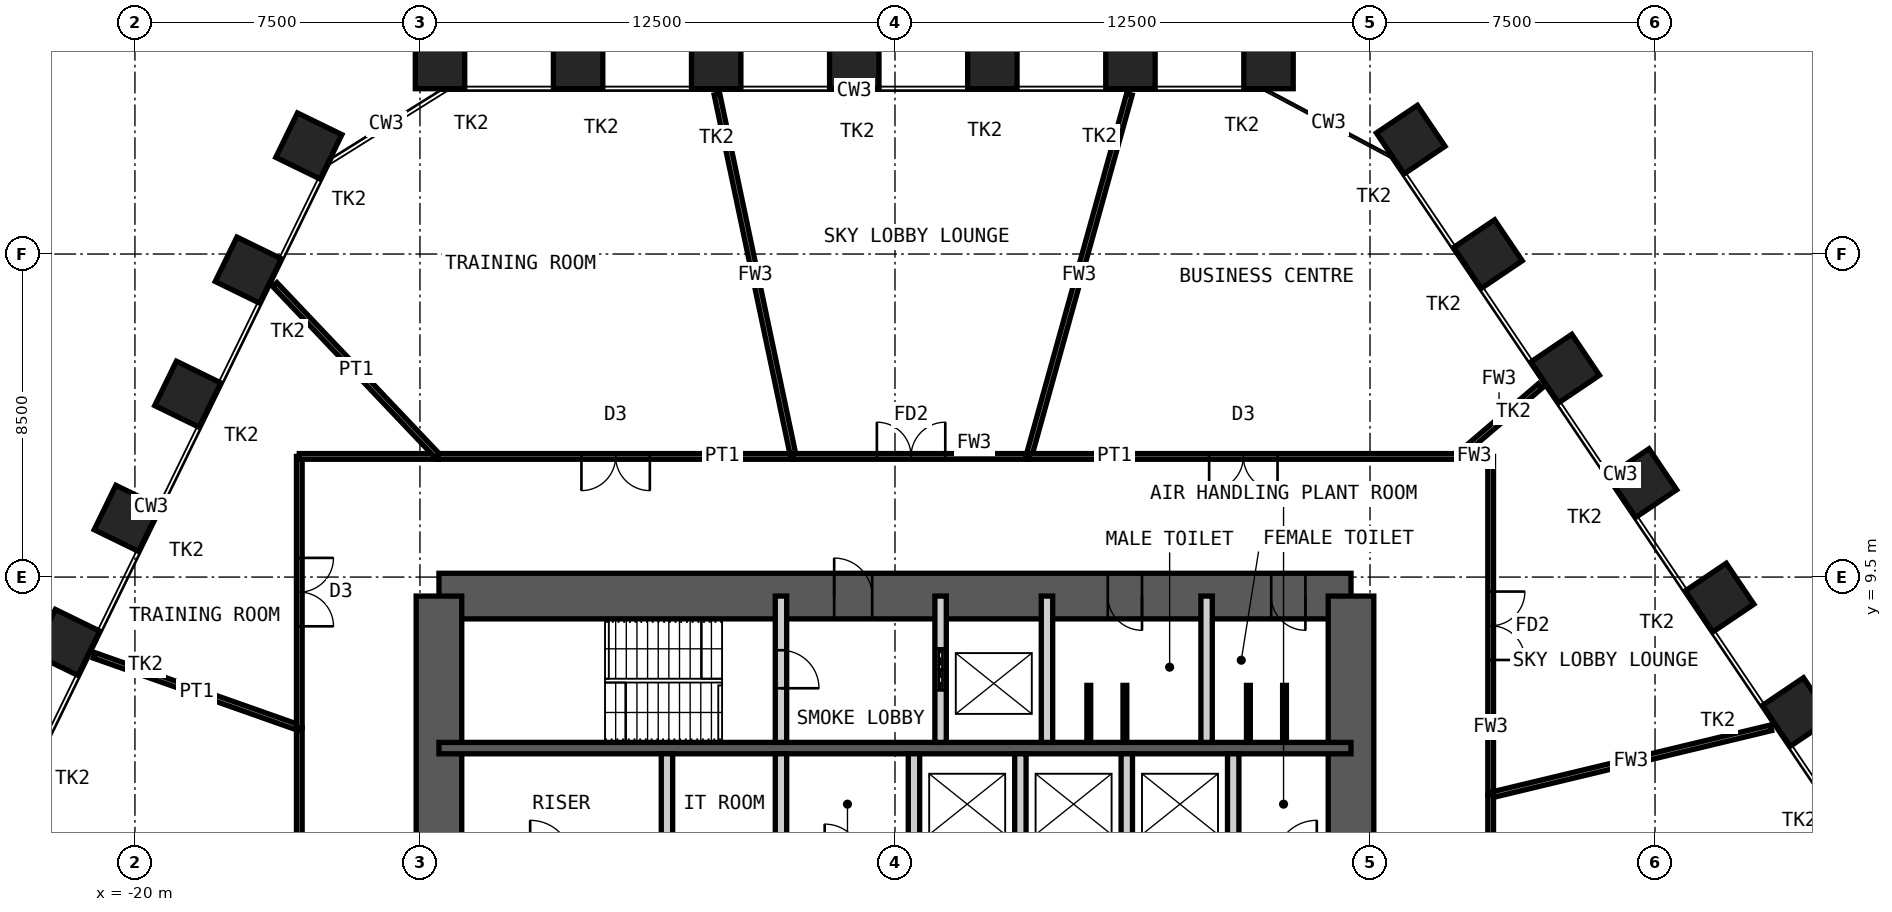
"""IFC4 building model, lengths in metres.
Left out: names, types, materials, properties, quantities, classifications, styles, units other than length and angle.
Written with IfcOpenShell. Run it as: python <this file> out.ifc"""

import sys

from ifc_helpers import new_model, si_unit, direction, frame, frame_2d, origin, origin_2d, place, context, subcontext, project, spatial, rectangle, hollow_rectangle, extrude, element, fill, save


model = new_model("IFC4")
c1 = context("Model", 3, precision=1e-05, world=origin(), true_north=direction((0.0, 1.0)))
c2 = subcontext(c1, "Body", "Model", "MODEL_VIEW")
j1 = project(units=[si_unit("LENGTHUNIT", "METRE"), si_unit("PLANEANGLEUNIT", "RADIAN")], contexts=[c1])
p1 = place(None, origin())
s1 = spatial("IfcSite", under=j1, at=p1, CompositionType="ELEMENT")
p2 = place(p1, origin())
s2 = spatial("IfcBuilding", under=s1, at=p2, CompositionType="ELEMENT")
p3 = place(p2, frame((0.0, 0.0, 180.4)))
s3 = spatial("IfcBuildingStorey", under=s2, at=p3, CompositionType="ELEMENT", Elevation=180.4)
for number, where, z_axis, x_axis in (
    (1, (-11.972, 23.0, 0.0), (0.0, 0.0, 1.0), (-1.0, 0.0, 0.0)),
    (2, (-8.338, 23.0, 0.0), (0.0, 0.0, 1.0), (-1.0, 0.0, 0.0)),
    (3, (-4.705, 23.0, 0.0), (0.0, 0.0, 1.0), (-1.0, 0.0, 0.0)),
    (4, (-1.071, 23.0, 0.0), (0.0, 0.0, 1.0), (-1.0, 0.0, 0.0)),
    (5, (2.562, 23.0, 0.0), (0.0, 0.0, 1.0), (-1.0, 0.0, 0.0)),
    (6, (6.196, 23.0, 0.0), (0.0, 0.0, 1.0), (-1.0, 0.0, 0.0)),
    (7, (9.829, 23.0, 0.0), (0.0, 0.0, 1.0), (-1.0, 0.0, 0.0)),
    (8, (13.571, 21.01, 0.0), (0.0, 0.0, 1.0), (-0.559, 0.829, 0.0)),
    (9, (15.603, 17.998, 0.0), (0.0, 0.0, 1.0), (-0.559, 0.829, 0.0)),
    (10, (17.635, 14.986, 0.0), (0.0, 0.0, 1.0), (-0.559, 0.829, 0.0)),
    (11, (19.667, 11.973, 0.0), (0.0, 0.0, 1.0), (-0.559, 0.829, 0.0)),
    (12, (21.699, 8.961, 0.0), (0.0, 0.0, 1.0), (-0.559, 0.829, 0.0)),
    (13, (23.731, 5.948, 0.0), (0.0, 0.0, 1.0), (-0.559, 0.829, 0.0)),
    (14, (-21.795, 7.78, 0.0), (0.0, 0.0, 1.0), (-0.438, -0.899, 0.0)),
    (15, (-20.203, 11.045, 0.0), (0.0, 0.0, 1.0), (-0.438, -0.899, 0.0)),
    (16, (-18.61, 14.311, 0.0), (0.0, 0.0, 1.0), (-0.438, -0.899, 0.0)),
    (17, (-17.017, 17.577, 0.0), (0.0, 0.0, 1.0), (-0.438, -0.899, 0.0)),
    (18, (-15.424, 20.843, 0.0), (0.0, 0.0, 1.0), (-0.438, -0.899, 0.0)),
):
    element("IfcColumn", number, at=place(p3, frame(where, z_axis=z_axis, x_axis=x_axis)), inside=s3, PredefinedType="COLUMN", context=c2, shape_type="SweptSolid", body=[
        extrude(hollow_rectangle(XDim=1.3, YDim=1.3, WallThickness=0.1, at=origin_2d()), origin(), (0.0, 0.0, 1.0), 4.2),
    ])
p4 = place(p3, frame((-12.0, 9.0, 0.0), z_axis=(0.0, 0.0, 1.0), x_axis=(1.0, 0.0, 0.0)))
e19 = element("IfcWall", 19, at=p4, inside=s3, PredefinedType="SHEAR", context=c2, shape_type="SweptSolid", body=[
    extrude(rectangle(XDim=24.0, YDim=1.2, at=frame_2d((12.0, 0.0))), origin(), (0.0, 0.0, 1.0), 4.2),
])
p5 = place(p4, frame((10.4, 0.0, 0.0)))
e20 = element("IfcOpeningElement", 20, at=p5, cuts=e19, PredefinedType="OPENING", context=c2, shape_type="SweptSolid", body=[
    extrude(rectangle(XDim=1.0, YDim=2.1, at=frame_2d((0.5, 1.05))), frame((0.0, 0.61, 0.0), z_axis=(0.0, -1.0, 0.0), x_axis=(1.0, 0.0, 0.0)), (0.0, 0.0, 1.0), 1.22),
])
p6 = place(p4, frame((17.6, 0.0, 0.0)))
e21 = element("IfcOpeningElement", 21, at=p6, cuts=e19, PredefinedType="OPENING", context=c2, shape_type="SweptSolid", body=[
    extrude(rectangle(XDim=0.9, YDim=2.1, at=frame_2d((0.45, 1.05))), frame((0.0, 0.61, 0.0), z_axis=(0.0, -1.0, 0.0), x_axis=(1.0, 0.0, 0.0)), (0.0, 0.0, 1.0), 1.22),
])
p7 = place(p4, frame((21.9, 0.0, 0.0)))
e22 = element("IfcOpeningElement", 22, at=p7, cuts=e19, PredefinedType="OPENING", context=c2, shape_type="SweptSolid", body=[
    extrude(rectangle(XDim=0.9, YDim=2.1, at=frame_2d((0.45, 1.05))), frame((0.0, 0.61, 0.0), z_axis=(0.0, -1.0, 0.0), x_axis=(1.0, 0.0, 0.0)), (0.0, 0.0, 1.0), 1.22),
])
p8 = place(p3, frame((12.0, -9.0, 0.0), z_axis=(0.0, 0.0, 1.0), x_axis=(0.0, 1.0, 0.0)))
e23 = element("IfcWall", 23, at=p8, inside=s3, PredefinedType="SHEAR", context=c2, shape_type="SweptSolid", body=[
    extrude(rectangle(XDim=18.0, YDim=1.2, at=frame_2d((9.0, 0.0))), origin(), (0.0, 0.0, 1.0), 4.2),
])
p9 = place(p8, frame((8.1, 0.0, 0.0)))
e24 = element("IfcOpeningElement", 24, at=p9, cuts=e23, PredefinedType="OPENING", context=c2, shape_type="SweptSolid", body=[
    extrude(rectangle(XDim=1.8, YDim=2.1, at=frame_2d((0.9, 1.05))), frame((0.0, 0.61, 0.0), z_axis=(0.0, -1.0, 0.0), x_axis=(1.0, 0.0, 0.0)), (0.0, 0.0, 1.0), 1.22),
])
p10 = place(p3, frame((-12.0, -9.0, 0.0), z_axis=(0.0, 0.0, 1.0), x_axis=(0.0, 1.0, 0.0)))
e25 = element("IfcWall", 25, at=p10, inside=s3, PredefinedType="SHEAR", context=c2, shape_type="SweptSolid", body=[
    extrude(rectangle(XDim=18.0, YDim=1.2, at=frame_2d((9.0, 0.0))), origin(), (0.0, 0.0, 1.0), 4.2),
])
p11 = place(p10, frame((8.1, 0.0, 0.0)))
e26 = element("IfcOpeningElement", 26, at=p11, cuts=e25, PredefinedType="OPENING", context=c2, shape_type="SweptSolid", body=[
    extrude(rectangle(XDim=1.8, YDim=2.1, at=frame_2d((0.9, 1.05))), frame((0.0, 0.61, 0.0), z_axis=(0.0, -1.0, 0.0), x_axis=(1.0, 0.0, 0.0)), (0.0, 0.0, 1.0), 1.22),
])
p12 = place(p3, frame((-12.0, 5.0, 0.0), z_axis=(0.0, 0.0, 1.0), x_axis=(1.0, 0.0, 0.0)))
e27 = element("IfcWall", 27, at=p12, inside=s3, PredefinedType="SHEAR", context=c2, shape_type="SweptSolid", body=[
    extrude(rectangle(XDim=24.0, YDim=0.3, at=frame_2d((12.0, 0.0))), origin(), (0.0, 0.0, 1.0), 4.2),
])
p13 = place(p3, frame((-3.0, 5.15, 0.0), z_axis=(0.0, 0.0, 1.0), x_axis=(0.0, 1.0, 0.0)))
e28 = element("IfcWall", 28, at=p13, inside=s3, PredefinedType="PARTITIONING", context=c2, shape_type="SweptSolid", body=[
    extrude(rectangle(XDim=3.85, YDim=0.3, at=frame_2d((1.925, 0.0))), origin(), (0.0, 0.0, 1.0), 3.98),
])
p14 = place(p13, frame((1.425, 0.0, 0.0)))
e29 = element("IfcOpeningElement", 29, at=p14, cuts=e28, PredefinedType="OPENING", context=c2, shape_type="SweptSolid", body=[
    extrude(rectangle(XDim=1.0, YDim=2.1, at=frame_2d((0.5, 1.05))), frame((0.0, 0.16, 0.0), z_axis=(0.0, -1.0, 0.0), x_axis=(1.0, 0.0, 0.0)), (0.0, 0.0, 1.0), 0.32),
])
p15 = place(p3, frame((1.2, 5.15, 0.0), z_axis=(0.0, 0.0, 1.0), x_axis=(0.0, 1.0, 0.0)))
e30 = element("IfcWall", 30, at=p15, inside=s3, PredefinedType="PARTITIONING", context=c2, shape_type="SweptSolid", body=[
    extrude(rectangle(XDim=3.85, YDim=0.3, at=frame_2d((1.925, 0.0))), origin(), (0.0, 0.0, 1.0), 3.98),
])
p16 = place(p15, frame((1.375, 0.0, 0.0)))
e31 = element("IfcOpeningElement", 31, at=p16, cuts=e30, PredefinedType="OPENING", context=c2, shape_type="SweptSolid", body=[
    extrude(rectangle(XDim=1.1, YDim=2.4, at=frame_2d((0.55, 1.2))), frame((0.0, 0.16, 0.0), z_axis=(0.0, -1.0, 0.0), x_axis=(1.0, 0.0, 0.0)), (0.0, 0.0, 1.0), 0.32),
])
for number, where, z_axis, x_axis in (
    (32, (4.0, 5.15, 0.0), (0.0, 0.0, 1.0), (0.0, 1.0, 0.0)),
    (33, (8.2, 5.15, 0.0), (0.0, 0.0, 1.0), (0.0, 1.0, 0.0)),
):
    element("IfcWall", number, at=place(p3, frame(where, z_axis=z_axis, x_axis=x_axis)), inside=s3, PredefinedType="PARTITIONING", context=c2, shape_type="SweptSolid", body=[
        extrude(rectangle(XDim=3.85, YDim=0.3, at=frame_2d((1.925, 0.0))), origin(), (0.0, 0.0, 1.0), 3.98),
    ])
for number, where, z_axis, x_axis in (
    (34, (-6.0, 2.2, 0.0), (0.0, 0.0, 1.0), (0.0, 1.0, 0.0)),
    (35, (-3.0, 2.2, 0.0), (0.0, 0.0, 1.0), (0.0, 1.0, 0.0)),
    (36, (0.5, 2.2, 0.0), (0.0, 0.0, 1.0), (0.0, 1.0, 0.0)),
    (37, (3.3, 2.2, 0.0), (0.0, 0.0, 1.0), (0.0, 1.0, 0.0)),
    (38, (6.1, 2.2, 0.0), (0.0, 0.0, 1.0), (0.0, 1.0, 0.0)),
    (39, (8.9, 2.2, 0.0), (0.0, 0.0, 1.0), (0.0, 1.0, 0.0)),
):
    element("IfcWall", number, at=place(p3, frame(where, z_axis=z_axis, x_axis=x_axis)), inside=s3, PredefinedType="PARTITIONING", context=c2, shape_type="SweptSolid", body=[
        extrude(rectangle(XDim=2.65, YDim=0.3, at=frame_2d((1.325, 0.0))), origin(), (0.0, 0.0, 1.0), 3.98),
    ])
for number, where, z_axis, x_axis in (
    (40, (5.1, 5.15, 0.0), (0.0, 0.0, 1.0), (0.0, 1.0, 0.0)),
    (41, (6.05, 5.15, 0.0), (0.0, 0.0, 1.0), (0.0, 1.0, 0.0)),
    (42, (9.3, 5.15, 0.0), (0.0, 0.0, 1.0), (0.0, 1.0, 0.0)),
    (43, (10.25, 5.15, 0.0), (0.0, 0.0, 1.0), (0.0, 1.0, 0.0)),
):
    element("IfcWall", number, at=place(p3, frame(where, z_axis=z_axis, x_axis=x_axis)), inside=s3, PredefinedType="PARTITIONING", context=c2, shape_type="SweptSolid", body=[
        extrude(rectangle(XDim=1.5, YDim=0.1, at=frame_2d((0.75, 0.0))), origin(), (0.0, 0.0, 1.0), 2.1),
    ])
p17 = place(p3, frame((16.979, 14.529, 0.0), z_axis=(0.0, 0.0, 1.0), x_axis=(-0.759812303941, -0.650142494212, 0.0)))
e44 = element("IfcWall", 44, at=p17, inside=s3, PredefinedType="PARTITIONING", context=c2, shape_type="SweptSolid", body=[
    extrude(rectangle(XDim=2.852, YDim=0.15, at=frame_2d((1.426, 0.0))), origin(), (0.0, 0.0, 1.0), 2.93),
])
p18 = place(p3, frame((14.812, 12.675, 0.0), z_axis=(0.0, 0.0, 1.0), x_axis=(1.0, 0.0, 0.0)))
e45 = element("IfcWall", 45, at=p18, inside=s3, PredefinedType="PARTITIONING", context=c2, shape_type="SweptSolid", body=[
    extrude(rectangle(XDim=0.863, YDim=0.15, at=frame_2d((0.432, 0.0))), origin(), (0.0, 0.0, 1.0), 4.03),
])
p19 = place(p3, frame((15.675, 12.675, 0.0), z_axis=(0.0, 0.0, 1.0), x_axis=(0.0, -1.0, 0.0)))
e46 = element("IfcWall", 46, at=p19, inside=s3, PredefinedType="PARTITIONING", context=c2, shape_type="SweptSolid", body=[
    extrude(rectangle(XDim=8.912, YDim=0.15, at=frame_2d((4.456, 0.0))), origin(), (0.0, 0.0, 1.0), 4.03),
])
p20 = place(p19, frame((3.556, 0.0, 0.0)))
e47 = element("IfcOpeningElement", 47, at=p20, cuts=e46, PredefinedType="OPENING", context=c2, shape_type="SweptSolid", body=[
    extrude(rectangle(XDim=1.8, YDim=2.1, at=frame_2d((0.9, 1.05))), frame((0.0, 0.085, 0.0), z_axis=(0.0, -1.0, 0.0), x_axis=(1.0, 0.0, 0.0)), (0.0, 0.0, 1.0), 0.17),
])
p21 = place(p3, frame((23.053, 5.534, 0.0), z_axis=(0.0, 0.0, 1.0), x_axis=(-0.97237853912, -0.233409461376, 0.0)))
e48 = element("IfcWall", 48, at=p21, inside=s3, PredefinedType="PARTITIONING", context=c2, shape_type="SweptSolid", body=[
    extrude(rectangle(XDim=7.587, YDim=0.15, at=frame_2d((3.794, 0.0))), origin(), (0.0, 0.0, 1.0), 2.93),
])
p22 = place(p3, frame((15.675, 3.763, 0.0), z_axis=(0.0, 0.0, 1.0), x_axis=(0.0, -1.0, 0.0)))
e49 = element("IfcWall", 49, at=p22, inside=s3, PredefinedType="PARTITIONING", context=c2, shape_type="SweptSolid", body=[
    extrude(rectangle(XDim=8.882, YDim=0.15, at=frame_2d((4.441, 0.0))), origin(), (0.0, 0.0, 1.0), 4.03),
])
p23 = place(p22, frame((3.541, 0.0, 0.0)))
e50 = element("IfcOpeningElement", 50, at=p23, cuts=e49, PredefinedType="OPENING", context=c2, shape_type="SweptSolid", body=[
    extrude(rectangle(XDim=1.8, YDim=2.4, at=frame_2d((0.9, 1.2))), frame((0.0, 0.085, 0.0), z_axis=(0.0, -1.0, 0.0), x_axis=(1.0, 0.0, 0.0)), (0.0, 0.0, 1.0), 0.17),
])
p24 = place(p3, frame((-15.675, -6.798, 0.0), z_axis=(0.0, 0.0, 1.0), x_axis=(0.0, 1.0, 0.0)))
e51 = element("IfcWall", 51, at=p24, inside=s3, PredefinedType="PARTITIONING", context=c2, shape_type="SweptSolid", body=[
    extrude(rectangle(XDim=12.332, YDim=0.15, at=frame_2d((6.166, 0.0))), origin(), (0.0, 0.0, 1.0), 4.03),
])
p25 = place(p24, frame((5.266, 0.0, 0.0)))
e52 = element("IfcOpeningElement", 52, at=p25, cuts=e51, PredefinedType="OPENING", context=c2, shape_type="SweptSolid", body=[
    extrude(rectangle(XDim=1.8, YDim=2.4, at=frame_2d((0.9, 1.2))), frame((0.0, 0.085, 0.0), z_axis=(0.0, -1.0, 0.0), x_axis=(1.0, 0.0, 0.0)), (0.0, 0.0, 1.0), 0.17),
])
p26 = place(p3, frame((-21.072, 7.439, 0.0), z_axis=(0.0, 0.0, 1.0), x_axis=(0.942965130718, -0.332891517241, 0.0)))
e53 = element("IfcWall", 53, at=p26, inside=s3, PredefinedType="PARTITIONING", context=c2, shape_type="SweptSolid", body=[
    extrude(rectangle(XDim=5.723, YDim=0.15, at=frame_2d((2.862, 0.0))), origin(), (0.0, 0.0, 1.0), 2.93),
])
p27 = place(p3, frame((-15.675, 5.534, 0.0), z_axis=(0.0, 0.0, 1.0), x_axis=(0.0, 1.0, 0.0)))
e54 = element("IfcWall", 54, at=p27, inside=s3, PredefinedType="PARTITIONING", context=c2, shape_type="SweptSolid", body=[
    extrude(rectangle(XDim=7.141, YDim=0.15, at=frame_2d((3.57, 0.0))), origin(), (0.0, 0.0, 1.0), 4.03),
])
p28 = place(p27, frame((2.67, 0.0, 0.0)))
e55 = element("IfcOpeningElement", 55, at=p28, cuts=e54, PredefinedType="OPENING", context=c2, shape_type="SweptSolid", body=[
    extrude(rectangle(XDim=1.8, YDim=2.4, at=frame_2d((0.9, 1.2))), frame((0.0, 0.085, 0.0), z_axis=(0.0, -1.0, 0.0), x_axis=(1.0, 0.0, 0.0)), (0.0, 0.0, 1.0), 0.17),
])
p29 = place(p3, frame((-15.675, 12.675, 0.0), z_axis=(0.0, 0.0, 1.0), x_axis=(1.0, 0.0, 0.0)))
e56 = element("IfcWall", 56, at=p29, inside=s3, PredefinedType="PARTITIONING", context=c2, shape_type="SweptSolid", body=[
    extrude(rectangle(XDim=3.648, YDim=0.15, at=frame_2d((1.824, 0.0))), origin(), (0.0, 0.0, 1.0), 4.03),
])
p30 = place(p3, frame((-16.319, 17.198, 0.0), z_axis=(0.0, 0.0, 1.0), x_axis=(0.688322255965, -0.725405039922, 0.0)))
e57 = element("IfcWall", 57, at=p30, inside=s3, PredefinedType="PARTITIONING", context=c2, shape_type="SweptSolid", body=[
    extrude(rectangle(XDim=6.235, YDim=0.15, at=frame_2d((3.117, 0.0))), origin(), (0.0, 0.0, 1.0), 2.93),
])
p31 = place(p3, frame((-12.027, 12.675, 0.0), z_axis=(0.0, 0.0, 1.0), x_axis=(1.0, 0.0, 0.0)))
e58 = element("IfcWall", 58, at=p31, inside=s3, PredefinedType="PARTITIONING", context=c2, shape_type="SweptSolid", body=[
    extrude(rectangle(XDim=9.353, YDim=0.15, at=frame_2d((4.677, 0.0))), origin(), (0.0, 0.0, 1.0), 4.03),
])
p32 = place(p31, frame((3.777, 0.0, 0.0)))
e59 = element("IfcOpeningElement", 59, at=p32, cuts=e58, PredefinedType="OPENING", context=c2, shape_type="SweptSolid", body=[
    extrude(rectangle(XDim=1.8, YDim=2.4, at=frame_2d((0.9, 1.2))), frame((0.0, 0.085, 0.0), z_axis=(0.0, -1.0, 0.0), x_axis=(1.0, 0.0, 0.0)), (0.0, 0.0, 1.0), 0.17),
])
p33 = place(p3, frame((-4.684, 22.202, 0.0), z_axis=(0.0, 0.0, 1.0), x_axis=(0.206457797677, -0.978455506284, 0.0)))
e60 = element("IfcWall", 60, at=p33, inside=s3, PredefinedType="PARTITIONING", context=c2, shape_type="SweptSolid", body=[
    extrude(rectangle(XDim=9.737, YDim=0.15, at=frame_2d((4.868, 0.0))), origin(), (0.0, 0.0, 1.0), 2.93),
])
p34 = place(p3, frame((-2.674, 12.675, 0.0), z_axis=(0.0, 0.0, 1.0), x_axis=(1.0, 0.0, 0.0)))
e61 = element("IfcWall", 61, at=p34, inside=s3, PredefinedType="PARTITIONING", context=c2, shape_type="SweptSolid", body=[
    extrude(rectangle(XDim=6.196, YDim=0.15, at=frame_2d((3.098, 0.0))), origin(), (0.0, 0.0, 1.0), 4.03),
])
p35 = place(p34, frame((2.198, 0.0, 0.0)))
e62 = element("IfcOpeningElement", 62, at=p35, cuts=e61, PredefinedType="OPENING", context=c2, shape_type="SweptSolid", body=[
    extrude(rectangle(XDim=1.8, YDim=2.1, at=frame_2d((0.9, 1.05))), frame((0.0, 0.085, 0.0), z_axis=(0.0, -1.0, 0.0), x_axis=(1.0, 0.0, 0.0)), (0.0, 0.0, 1.0), 0.17),
])
p36 = place(p3, frame((6.169, 22.204, 0.0), z_axis=(0.0, 0.0, 1.0), x_axis=(-0.267703705781, -0.963501284852, 0.0)))
e63 = element("IfcWall", 63, at=p36, inside=s3, PredefinedType="PARTITIONING", context=c2, shape_type="SweptSolid", body=[
    extrude(rectangle(XDim=9.889, YDim=0.15, at=frame_2d((4.945, 0.0))), origin(), (0.0, 0.0, 1.0), 2.93),
])
p37 = place(p3, frame((3.521, 12.675, 0.0), z_axis=(0.0, 0.0, 1.0), x_axis=(1.0, 0.0, 0.0)))
e64 = element("IfcWall", 64, at=p37, inside=s3, PredefinedType="PARTITIONING", context=c2, shape_type="SweptSolid", body=[
    extrude(rectangle(XDim=11.291, YDim=0.15, at=frame_2d((5.645, 0.0))), origin(), (0.0, 0.0, 1.0), 4.03),
])
p38 = place(p37, frame((4.745, 0.0, 0.0)))
e65 = element("IfcOpeningElement", 65, at=p38, cuts=e64, PredefinedType="OPENING", context=c2, shape_type="SweptSolid", body=[
    extrude(rectangle(XDim=1.8, YDim=2.4, at=frame_2d((0.9, 1.2))), frame((0.0, 0.085, 0.0), z_axis=(0.0, -1.0, 0.0), x_axis=(1.0, 0.0, 0.0)), (0.0, 0.0, 1.0), 0.17),
])
p39 = place(p5, origin())
e66 = element("IfcDoor", 66, at=p39, inside=s3, OperationType="SINGLE_SWING_RIGHT", PredefinedType="DOOR", context=c2, shape_type="SweptSolid", body=[
    extrude(rectangle(XDim=1.0, YDim=2.1, at=frame_2d((0.5, 1.05))), frame((0.0, 0.025, 0.0), z_axis=(0.0, -1.0, 0.0), x_axis=(1.0, 0.0, 0.0)), (0.0, 0.0, 1.0), 0.05),
])
fill(e20, e66)
p40 = place(p6, origin())
e67 = element("IfcDoor", 67, at=p40, inside=s3, OperationType="SINGLE_SWING_RIGHT", PredefinedType="DOOR", context=c2, shape_type="SweptSolid", body=[
    extrude(rectangle(XDim=0.9, YDim=2.1, at=frame_2d((0.45, 1.05))), frame((0.0, 0.025, 0.0), z_axis=(0.0, -1.0, 0.0), x_axis=(1.0, 0.0, 0.0)), (0.0, 0.0, 1.0), 0.05),
])
fill(e21, e67)
p41 = place(p7, origin())
e68 = element("IfcDoor", 68, at=p41, inside=s3, OperationType="SINGLE_SWING_RIGHT", PredefinedType="DOOR", context=c2, shape_type="SweptSolid", body=[
    extrude(rectangle(XDim=0.9, YDim=2.1, at=frame_2d((0.45, 1.05))), frame((0.0, 0.025, 0.0), z_axis=(0.0, -1.0, 0.0), x_axis=(1.0, 0.0, 0.0)), (0.0, 0.0, 1.0), 0.05),
])
fill(e22, e68)
p42 = place(p14, origin())
e69 = element("IfcDoor", 69, at=p42, inside=s3, OperationType="SINGLE_SWING_LEFT", PredefinedType="DOOR", context=c2, shape_type="SweptSolid", body=[
    extrude(rectangle(XDim=1.0, YDim=2.1, at=frame_2d((0.5, 1.05))), frame((0.0, 0.025, 0.0), z_axis=(0.0, -1.0, 0.0), x_axis=(1.0, 0.0, 0.0)), (0.0, 0.0, 1.0), 0.05),
])
fill(e29, e69)
p43 = place(p16, origin())
e70 = element("IfcDoor", 70, at=p43, inside=s3, OperationType="DOUBLE_DOOR_SLIDING", PredefinedType="DOOR", context=c2, shape_type="SweptSolid", body=[
    extrude(rectangle(XDim=1.1, YDim=2.4, at=frame_2d((0.55, 1.2))), frame((0.0, 0.025, 0.0), z_axis=(0.0, -1.0, 0.0), x_axis=(1.0, 0.0, 0.0)), (0.0, 0.0, 1.0), 0.05),
])
fill(e31, e70)
p44 = place(p20, origin())
e71 = element("IfcDoor", 71, at=p44, inside=s3, OperationType="DOUBLE_DOOR_DOUBLE_SWING", PredefinedType="DOOR", context=c2, shape_type="SweptSolid", body=[
    extrude(rectangle(XDim=1.8, YDim=2.1, at=frame_2d((0.9, 1.05))), frame((0.0, 0.025, 0.0), z_axis=(0.0, -1.0, 0.0), x_axis=(1.0, 0.0, 0.0)), (0.0, 0.0, 1.0), 0.05),
])
fill(e47, e71)
p45 = place(p28, origin())
e72 = element("IfcDoor", 72, at=p45, inside=s3, OperationType="DOUBLE_DOOR_DOUBLE_SWING", PredefinedType="DOOR", context=c2, shape_type="SweptSolid", body=[
    extrude(rectangle(XDim=1.8, YDim=2.4, at=frame_2d((0.9, 1.2))), frame((0.0, 0.025, 0.0), z_axis=(0.0, -1.0, 0.0), x_axis=(1.0, 0.0, 0.0)), (0.0, 0.0, 1.0), 0.05),
])
fill(e55, e72)
p46 = place(p32, origin())
e73 = element("IfcDoor", 73, at=p46, inside=s3, OperationType="DOUBLE_DOOR_DOUBLE_SWING", PredefinedType="DOOR", context=c2, shape_type="SweptSolid", body=[
    extrude(rectangle(XDim=1.8, YDim=2.4, at=frame_2d((0.9, 1.2))), frame((0.0, 0.025, 0.0), z_axis=(0.0, -1.0, 0.0), x_axis=(1.0, 0.0, 0.0)), (0.0, 0.0, 1.0), 0.05),
])
fill(e59, e73)
p47 = place(p35, origin())
e74 = element("IfcDoor", 74, at=p47, inside=s3, OperationType="DOUBLE_DOOR_DOUBLE_SWING", PredefinedType="DOOR", context=c2, shape_type="SweptSolid", body=[
    extrude(rectangle(XDim=1.8, YDim=2.1, at=frame_2d((0.9, 1.05))), frame((0.0, 0.025, 0.0), z_axis=(0.0, -1.0, 0.0), x_axis=(1.0, 0.0, 0.0)), (0.0, 0.0, 1.0), 0.05),
])
fill(e62, e74)
p48 = place(p38, origin())
e75 = element("IfcDoor", 75, at=p48, inside=s3, OperationType="DOUBLE_DOOR_DOUBLE_SWING", PredefinedType="DOOR", context=c2, shape_type="SweptSolid", body=[
    extrude(rectangle(XDim=1.8, YDim=2.4, at=frame_2d((0.9, 1.2))), frame((0.0, 0.025, 0.0), z_axis=(0.0, -1.0, 0.0), x_axis=(1.0, 0.0, 0.0)), (0.0, 0.0, 1.0), 0.05),
])
fill(e65, e75)
save(model, sys.argv[1])
